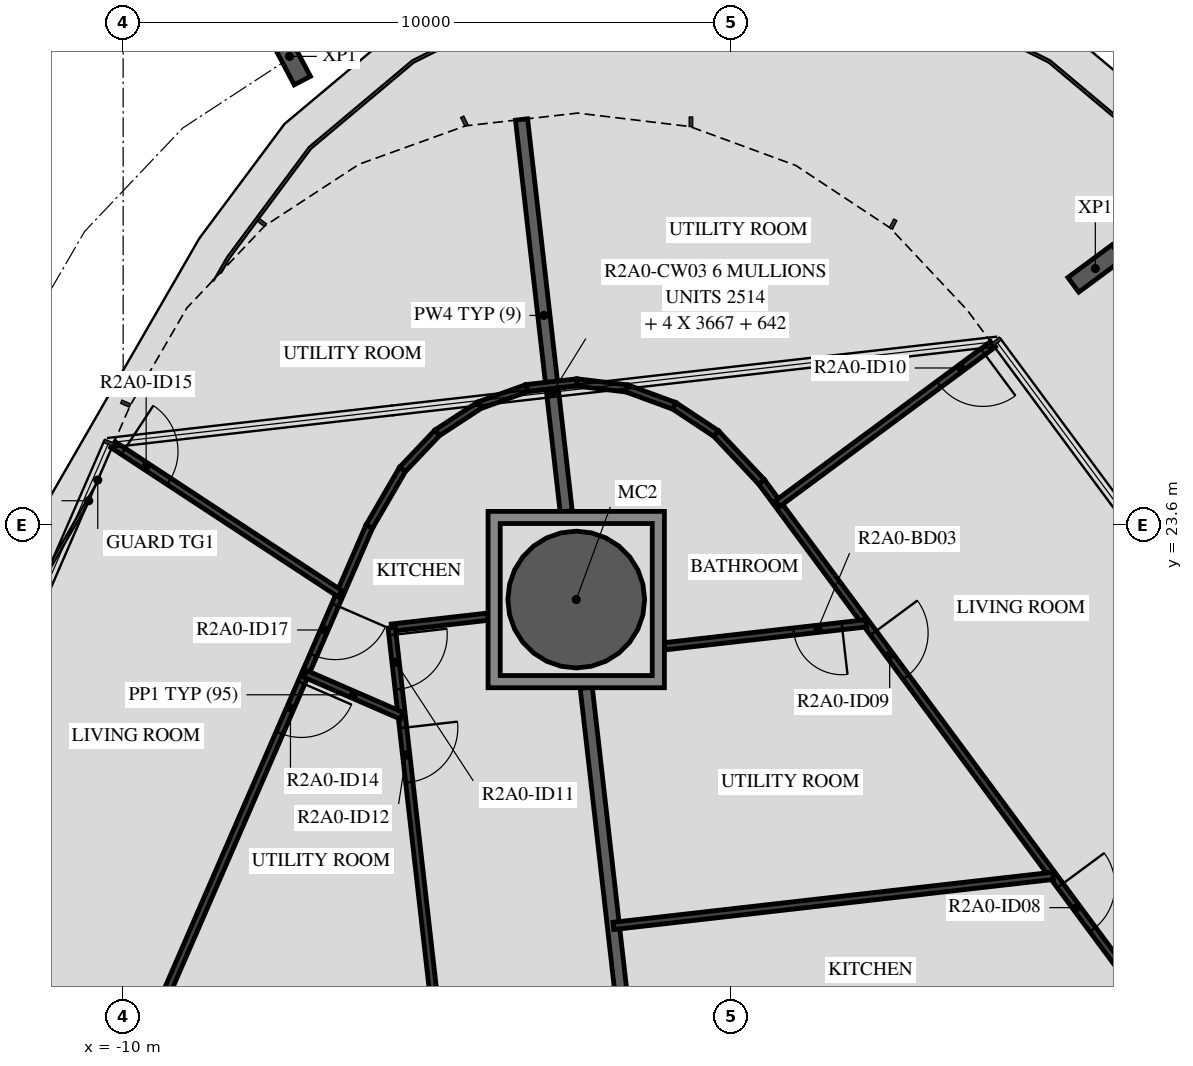
"""IFC4 building model, lengths in metres.
Left out: names, types, materials, properties, quantities, classifications, styles, units other than length and angle.
Written with IfcOpenShell. Run it as: python <this file> out.ifc"""

import sys

from ifc_helpers import new_model, si_unit, direction, frame, frame_2d, origin, origin_2d, place, context, subcontext, project, spatial, polyline, rectangle, hollow_circle, i_section, outline, extrude, element, fill, save


model = new_model("IFC4")
c1 = context("Model", 3, precision=1e-05, world=origin(), true_north=direction((0.0, 1.0)))
c2 = subcontext(c1, "Body", "Model", "MODEL_VIEW")
j1 = project(units=[si_unit("LENGTHUNIT", "METRE"), si_unit("PLANEANGLEUNIT", "RADIAN")], contexts=[c1])
p1 = place(None, origin())
s1 = spatial("IfcSite", under=j1, at=p1, CompositionType="ELEMENT")
p2 = place(p1, origin())
s2 = spatial("IfcBuilding", under=s1, at=p2, CompositionType="ELEMENT")
p3 = place(p2, frame((0.0, 0.0, 76.7)))
s3 = spatial("IfcBuildingStorey", under=s2, at=p3, CompositionType="ELEMENT", Elevation=76.7)
p4 = place(p3, frame((-2.549, 22.37, -0.45), z_axis=(0.0, 0.0, 1.0), x_axis=(1.0, 0.0, 0.0)))
e1 = element("IfcColumn", 1, at=p4, inside=s3, PredefinedType="COLUMN", context=c2, shape_type="SweptSolid", body=[
    extrude(hollow_circle(Radius=1.125, WallThickness=0.055, at=origin_2d()), origin(), (0.0, 0.0, 1.0), 3.57),
])
for number, where, z_axis, x_axis in (
    (2, (5.988, 27.814, -0.45), (0.0, 0.0, 1.0), (0.595, -0.804, 0.0)),
    (3, (-7.263, 31.302, -0.45), (0.0, 0.0, 1.0), (0.884, 0.467, 0.0)),
):
    element("IfcColumn", number, at=place(p3, frame(where, z_axis=z_axis, x_axis=x_axis)), inside=s3, PredefinedType="COLUMN", context=c2, shape_type="SweptSolid", body=[
        extrude(i_section(OverallWidth=0.3, OverallDepth=0.9, WebThickness=0.019, FlangeThickness=0.035, FilletRadius=0.03, at=origin_2d()), origin(), (0.0, 0.0, 1.0), 3.57),
    ])
p5 = place(p3, frame((-2.385, 20.92, 0.0), z_axis=(0.0, 0.0, 1.0), x_axis=(0.113177776247, -0.993574753586, 0.0)))
e4 = element("IfcWall", 4, at=p5, inside=s3, PredefinedType="STANDARD", context=c2, shape_type="SweptSolid", body=[
    extrude(rectangle(XDim=7.356, YDim=0.2, at=frame_2d((3.678, 0.0))), origin(), (0.0, 0.0, 1.0), 3.12),
])
p6 = place(p3, frame((-3.448, 30.265, 0.0), z_axis=(0.0, 0.0, 1.0), x_axis=(0.113178237968, -0.993574700992, 0.0)))
e5 = element("IfcWall", 5, at=p6, inside=s3, PredefinedType="STANDARD", context=c2, shape_type="SweptSolid", body=[
    extrude(rectangle(XDim=6.487, YDim=0.2, at=frame_2d((3.243, 0.0))), origin(), (0.0, 0.0, 1.0), 3.12),
])
p7 = place(p3, frame((0.498, 24.306, 0.0), z_axis=(0.0, 0.0, 1.0), x_axis=(0.594826266513, -0.803854285718, 0.0)))
e6 = element("IfcWall", 6, at=p7, inside=s3, PredefinedType="PARTITIONING", context=c2, shape_type="SweptSolid", body=[
    extrude(rectangle(XDim=11.875, YDim=0.12, at=frame_2d((5.938, 0.0))), origin(), (0.0, 0.0, 1.0), 3.12),
])
p8 = place(p7, frame((8.26, 0.0, 0.0)))
e7 = element("IfcOpeningElement", 7, at=p8, cuts=e6, PredefinedType="OPENING", context=c2, shape_type="SweptSolid", body=[
    extrude(rectangle(XDim=0.9, YDim=2.1, at=frame_2d((0.45, 1.05))), frame((0.0, 0.07, 0.0), z_axis=(0.0, -1.0, 0.0), x_axis=(1.0, 0.0, 0.0)), (0.0, 0.0, 1.0), 0.14),
])
p9 = place(p7, frame((3.094, 0.0, 0.0)))
e8 = element("IfcOpeningElement", 8, at=p9, cuts=e6, PredefinedType="OPENING", context=c2, shape_type="SweptSolid", body=[
    extrude(rectangle(XDim=0.9, YDim=2.1, at=frame_2d((0.45, 1.05))), frame((0.0, 0.07, 0.0), z_axis=(0.0, -1.0, 0.0), x_axis=(1.0, 0.0, 0.0)), (0.0, 0.0, 1.0), 0.14),
])
p10 = place(p3, frame((4.299, 26.565, 0.0), z_axis=(0.0, 0.0, 1.0), x_axis=(-0.803851981262, -0.594829380764, 0.0)))
e9 = element("IfcWall", 9, at=p10, inside=s3, PredefinedType="PARTITIONING", context=c2, shape_type="SweptSolid", body=[
    extrude(rectangle(XDim=4.4, YDim=0.12, at=frame_2d((2.2, 0.0))), origin(), (0.0, 0.0, 1.0), 2.73),
])
p11 = place(p10, frame((0.2, 0.0, 0.0)))
e10 = element("IfcOpeningElement", 10, at=p11, cuts=e9, PredefinedType="OPENING", context=c2, shape_type="SweptSolid", body=[
    extrude(rectangle(XDim=0.9, YDim=2.1, at=frame_2d((0.45, 1.05))), frame((0.0, 0.07, 0.0), z_axis=(0.0, -1.0, 0.0), x_axis=(1.0, 0.0, 0.0)), (0.0, 0.0, 1.0), 0.14),
])
p12 = place(p3, frame((5.292, 17.827, 0.0), z_axis=(0.0, 0.0, 1.0), x_axis=(-0.993570041735, -0.113219133399, 0.0)))
e11 = element("IfcWall", 11, at=p12, inside=s3, PredefinedType="PARTITIONING", context=c2, shape_type="SweptSolid", body=[
    extrude(rectangle(XDim=7.276, YDim=0.12, at=frame_2d((3.638, 0.0))), origin(), (0.0, 0.0, 1.0), 3.12),
])
p13 = place(p3, frame((2.219, 21.979, 0.0), z_axis=(0.0, 0.0, 1.0), x_axis=(-0.99357408397, -0.113183654573, 0.0)))
e12 = element("IfcWall", 12, at=p13, inside=s3, PredefinedType="PARTITIONING", context=c2, shape_type="SweptSolid", body=[
    extrude(rectangle(XDim=3.339, YDim=0.12, at=frame_2d((1.669, 0.0))), origin(), (0.0, 0.0, 1.0), 3.12),
])
p14 = place(p13, frame((0.4, 0.0, 0.0)))
e13 = element("IfcOpeningElement", 13, at=p14, cuts=e12, PredefinedType="OPENING", context=c2, shape_type="SweptSolid", body=[
    extrude(rectangle(XDim=0.8, YDim=2.1, at=frame_2d((0.4, 1.05))), frame((0.0, 0.07, 0.0), z_axis=(0.0, -1.0, 0.0), x_axis=(1.0, 0.0, 0.0)), (0.0, 0.0, 1.0), 0.14),
])
for number, where, z_axis, x_axis in (
    (14, (-3.362, 25.846, 0.0), (0.0, 0.0, 1.0), (0.994, 0.113, 0.0)),
    (15, (-2.538, 25.94, 0.0), (0.0, 0.0, 1.0), (0.993, -0.119, 0.0)),
    (16, (-1.715, 25.842, 0.0), (0.0, 0.0, 1.0), (0.939, -0.345, 0.0)),
    (17, (-0.937, 25.556, 0.0), (0.0, 0.0, 1.0), (0.834, -0.552, 0.0)),
):
    element("IfcWall", number, at=place(p3, frame(where, z_axis=z_axis, x_axis=x_axis)), inside=s3, PredefinedType="PARTITIONING", context=c2, shape_type="SweptSolid", body=[
        extrude(rectangle(XDim=0.829, YDim=0.12, at=frame_2d((0.415, 0.0))), origin(), (0.0, 0.0, 1.0), 3.12),
    ])
p15 = place(p3, frame((-0.246, 25.098, 0.0), z_axis=(0.0, 0.0, 1.0), x_axis=(0.684172712488, -0.729320025426, 0.0)))
e18 = element("IfcWall", 18, at=p15, inside=s3, PredefinedType="PARTITIONING", context=c2, shape_type="SweptSolid", body=[
    extrude(rectangle(XDim=1.087, YDim=0.12, at=frame_2d((0.543, 0.0))), origin(), (0.0, 0.0, 1.0), 3.12),
])
p16 = place(p3, frame((-3.999, 22.089, 0.0), z_axis=(0.0, 0.0, 1.0), x_axis=(-0.993550908639, -0.113386912568, 0.0)))
e19 = element("IfcWall", 19, at=p16, inside=s3, PredefinedType="PARTITIONING", context=c2, shape_type="SweptSolid", body=[
    extrude(rectangle(XDim=1.595, YDim=0.12, at=frame_2d((0.798, 0.0))), origin(), (0.0, 0.0, 1.0), 3.12),
])
p17 = place(p3, frame((-5.584, 21.908, 0.0), z_axis=(0.0, 0.0, 1.0), x_axis=(0.113192725021, -0.993573050662, 0.0)))
e20 = element("IfcWall", 20, at=p17, inside=s3, PredefinedType="PARTITIONING", context=c2, shape_type="SweptSolid", body=[
    extrude(rectangle(XDim=7.2, YDim=0.12, at=frame_2d((3.6, 0.0))), origin(), (0.0, 0.0, 1.0), 3.12),
])
p18 = place(p17, frame((0.12, 0.0, 0.0)))
e21 = element("IfcOpeningElement", 21, at=p18, cuts=e20, PredefinedType="OPENING", context=c2, shape_type="SweptSolid", body=[
    extrude(rectangle(XDim=0.9, YDim=2.1, at=frame_2d((0.45, 1.05))), frame((0.0, 0.07, 0.0), z_axis=(0.0, -1.0, 0.0), x_axis=(1.0, 0.0, 0.0)), (0.0, 0.0, 1.0), 0.14),
])
p19 = place(p17, frame((1.658, 0.0, 0.0)))
e22 = element("IfcOpeningElement", 22, at=p19, cuts=e20, PredefinedType="OPENING", context=c2, shape_type="SweptSolid", body=[
    extrude(rectangle(XDim=0.9, YDim=2.1, at=frame_2d((0.45, 1.05))), frame((0.0, 0.07, 0.0), z_axis=(0.0, -1.0, 0.0), x_axis=(1.0, 0.0, 0.0)), (0.0, 0.0, 1.0), 0.14),
])
p20 = place(p3, frame((-3.362, 25.846, 0.0), z_axis=(0.0, 0.0, 1.0), x_axis=(-0.940718391217, -0.33918860303, 0.0)))
e23 = element("IfcWall", 23, at=p20, inside=s3, PredefinedType="PARTITIONING", context=c2, shape_type="SweptSolid", body=[
    extrude(rectangle(XDim=0.829, YDim=0.12, at=frame_2d((0.415, 0.0))), origin(), (0.0, 0.0, 1.0), 3.12),
])
p21 = place(p3, frame((-4.142, 25.565, 0.0), z_axis=(0.0, 0.0, 1.0), x_axis=(-0.837047461437, -0.547130283664, 0.0)))
e24 = element("IfcWall", 24, at=p21, inside=s3, PredefinedType="PARTITIONING", context=c2, shape_type="SweptSolid", body=[
    extrude(rectangle(XDim=0.829, YDim=0.12, at=frame_2d((0.414, 0.0))), origin(), (0.0, 0.0, 1.0), 3.12),
])
p22 = place(p3, frame((-4.835, 25.112, 0.0), z_axis=(0.0, 0.0, 1.0), x_axis=(-0.688463067416, -0.72527140079, 0.0)))
e25 = element("IfcWall", 25, at=p22, inside=s3, PredefinedType="PARTITIONING", context=c2, shape_type="SweptSolid", body=[
    extrude(rectangle(XDim=0.829, YDim=0.12, at=frame_2d((0.415, 0.0))), origin(), (0.0, 0.0, 1.0), 3.12),
])
p23 = place(p3, frame((-5.406, 24.51, 0.0), z_axis=(0.0, 0.0, 1.0), x_axis=(-0.502487709822, -0.864584351858, 0.0)))
e26 = element("IfcWall", 26, at=p23, inside=s3, PredefinedType="PARTITIONING", context=c2, shape_type="SweptSolid", body=[
    extrude(rectangle(XDim=1.087, YDim=0.12, at=frame_2d((0.543, 0.0))), origin(), (0.0, 0.0, 1.0), 3.12),
])
p24 = place(p3, frame((-5.952, 23.571, 0.0), z_axis=(0.0, 0.0, 1.0), x_axis=(-0.398745097158, -0.917061801348, 0.0)))
e27 = element("IfcWall", 27, at=p24, inside=s3, PredefinedType="PARTITIONING", context=c2, shape_type="SweptSolid", body=[
    extrude(rectangle(XDim=14.576, YDim=0.12, at=frame_2d((7.288, 0.0))), origin(), (0.0, 0.0, 1.0), 3.12),
])
p25 = place(p24, frame((2.801, 0.0, 0.0)))
e28 = element("IfcOpeningElement", 28, at=p25, cuts=e27, PredefinedType="OPENING", context=c2, shape_type="SweptSolid", body=[
    extrude(rectangle(XDim=0.9, YDim=2.1, at=frame_2d((0.45, 1.05))), frame((0.0, 0.07, 0.0), z_axis=(0.0, -1.0, 0.0), x_axis=(1.0, 0.0, 0.0)), (0.0, 0.0, 1.0), 0.14),
])
p26 = place(p24, frame((1.405, 0.0, 0.0)))
e29 = element("IfcOpeningElement", 29, at=p26, cuts=e27, PredefinedType="OPENING", context=c2, shape_type="SweptSolid", body=[
    extrude(rectangle(XDim=0.9, YDim=2.1, at=frame_2d((0.45, 1.05))), frame((0.0, 0.07, 0.0), z_axis=(0.0, -1.0, 0.0), x_axis=(1.0, 0.0, 0.0)), (0.0, 0.0, 1.0), 0.14),
])
p27 = place(p3, frame((-7.005, 21.149, 0.0), z_axis=(0.0, 0.0, 1.0), x_axis=(0.917081274718, -0.398700307953, 0.0)))
e30 = element("IfcWall", 30, at=p27, inside=s3, PredefinedType="PARTITIONING", context=c2, shape_type="SweptSolid", body=[
    extrude(rectangle(XDim=1.73, YDim=0.12, at=frame_2d((0.865, 0.0))), origin(), (0.0, 0.0, 1.0), 3.12),
])
p28 = place(p3, frame((-10.165, 24.917, 0.0), z_axis=(0.0, 0.0, 1.0), x_axis=(0.835849562932, -0.548958566876, 0.0)))
e31 = element("IfcWall", 31, at=p28, inside=s3, PredefinedType="PARTITIONING", context=c2, shape_type="SweptSolid", body=[
    extrude(rectangle(XDim=4.465, YDim=0.12, at=frame_2d((2.232, 0.0))), origin(), (0.0, 0.0, 1.0), 2.73),
])
p29 = place(p28, frame((0.2, 0.0, 0.0)))
e32 = element("IfcOpeningElement", 32, at=p29, cuts=e31, PredefinedType="OPENING", context=c2, shape_type="SweptSolid", body=[
    extrude(rectangle(XDim=0.9, YDim=2.1, at=frame_2d((0.45, 1.05))), frame((0.0, 0.07, 0.0), z_axis=(0.0, -1.0, 0.0), x_axis=(1.0, 0.0, 0.0)), (0.0, 0.0, 1.0), 0.14),
])
p30 = place(p3, frame((-13.163, 18.022, 0.0), z_axis=(0.0, 0.0, 1.0), x_axis=(0.594797671626, -0.803875444226, 0.0)))
e33 = element("IfcWall", 33, at=p30, inside=s3, PredefinedType="PARTITIONING", context=c2, shape_type="SweptSolid", body=[
    extrude(rectangle(XDim=5.081, YDim=0.12, at=frame_2d((2.54, 0.0))), origin(), (0.0, 0.0, 1.0), 3.12),
])
p31 = place(p30, frame((0.4, 0.0, 0.0)))
e34 = element("IfcOpeningElement", 34, at=p31, cuts=e33, PredefinedType="OPENING", context=c2, shape_type="SweptSolid", body=[
    extrude(rectangle(XDim=0.9, YDim=2.1, at=frame_2d((0.45, 1.05))), frame((0.0, 0.07, 0.0), z_axis=(0.0, -1.0, 0.0), x_axis=(1.0, 0.0, 0.0)), (0.0, 0.0, 1.0), 0.14),
])
p32 = place(p3, origin())
e35 = element("IfcWall", 35, at=p32, inside=s3, PredefinedType="STANDARD", context=c2, shape_type="SweptSolid", body=[
    extrude(outline(polyline([(-1.099, 23.82), (-1.099, 20.92), (-3.999, 20.92), (-3.999, 23.82), (-1.099, 23.82)]), holes=[polyline([(-3.799, 21.12), (-1.299, 21.12), (-1.299, 23.62), (-3.799, 23.62), (-3.799, 21.12)])]), origin(), (0.0, 0.0, 1.0), 3.12),
])
p33 = place(p8, origin())
e36 = element("IfcDoor", 36, at=p33, inside=s3, OperationType="SINGLE_SWING_RIGHT", PredefinedType="DOOR", context=c2, shape_type="SweptSolid", body=[
    extrude(rectangle(XDim=0.9, YDim=2.1, at=frame_2d((0.45, 1.05))), frame((0.0, 0.025, 0.0), z_axis=(0.0, -1.0, 0.0), x_axis=(1.0, 0.0, 0.0)), (0.0, 0.0, 1.0), 0.05),
])
fill(e7, e36)
p34 = place(p9, origin())
e37 = element("IfcDoor", 37, at=p34, inside=s3, OperationType="SINGLE_SWING_LEFT", PredefinedType="DOOR", context=c2, shape_type="SweptSolid", body=[
    extrude(rectangle(XDim=0.9, YDim=2.1, at=frame_2d((0.45, 1.05))), frame((0.0, 0.025, 0.0), z_axis=(0.0, -1.0, 0.0), x_axis=(1.0, 0.0, 0.0)), (0.0, 0.0, 1.0), 0.05),
])
fill(e8, e37)
p35 = place(p14, origin())
e38 = element("IfcDoor", 38, at=p35, inside=s3, OperationType="SINGLE_SWING_RIGHT", PredefinedType="DOOR", context=c2, shape_type="SweptSolid", body=[
    extrude(rectangle(XDim=0.8, YDim=2.1, at=frame_2d((0.4, 1.05))), frame((0.0, 0.025, 0.0), z_axis=(0.0, -1.0, 0.0), x_axis=(1.0, 0.0, 0.0)), (0.0, 0.0, 1.0), 0.05),
])
fill(e13, e38)
p36 = place(p11, origin())
e39 = element("IfcDoor", 39, at=p36, inside=s3, OperationType="SINGLE_SWING_RIGHT", PredefinedType="DOOR", context=c2, shape_type="SweptSolid", body=[
    extrude(rectangle(XDim=0.9, YDim=2.1, at=frame_2d((0.45, 1.05))), frame((0.0, 0.025, 0.0), z_axis=(0.0, -1.0, 0.0), x_axis=(1.0, 0.0, 0.0)), (0.0, 0.0, 1.0), 0.05),
])
fill(e10, e39)
p37 = place(p18, origin())
e40 = element("IfcDoor", 40, at=p37, inside=s3, OperationType="SINGLE_SWING_RIGHT", PredefinedType="DOOR", context=c2, shape_type="SweptSolid", body=[
    extrude(rectangle(XDim=0.9, YDim=2.1, at=frame_2d((0.45, 1.05))), frame((0.0, 0.025, 0.0), z_axis=(0.0, -1.0, 0.0), x_axis=(1.0, 0.0, 0.0)), (0.0, 0.0, 1.0), 0.05),
])
fill(e21, e40)
p38 = place(p19, origin())
e41 = element("IfcDoor", 41, at=p38, inside=s3, OperationType="SINGLE_SWING_LEFT", PredefinedType="DOOR", context=c2, shape_type="SweptSolid", body=[
    extrude(rectangle(XDim=0.9, YDim=2.1, at=frame_2d((0.45, 1.05))), frame((0.0, 0.025, 0.0), z_axis=(0.0, -1.0, 0.0), x_axis=(1.0, 0.0, 0.0)), (0.0, 0.0, 1.0), 0.05),
])
fill(e22, e41)
p39 = place(p25, origin())
e42 = element("IfcDoor", 42, at=p39, inside=s3, OperationType="SINGLE_SWING_LEFT", PredefinedType="DOOR", context=c2, shape_type="SweptSolid", body=[
    extrude(rectangle(XDim=0.9, YDim=2.1, at=frame_2d((0.45, 1.05))), frame((0.0, 0.025, 0.0), z_axis=(0.0, -1.0, 0.0), x_axis=(1.0, 0.0, 0.0)), (0.0, 0.0, 1.0), 0.05),
])
fill(e28, e42)
p40 = place(p29, origin())
e43 = element("IfcDoor", 43, at=p40, inside=s3, OperationType="SINGLE_SWING_LEFT", PredefinedType="DOOR", context=c2, shape_type="SweptSolid", body=[
    extrude(rectangle(XDim=0.9, YDim=2.1, at=frame_2d((0.45, 1.05))), frame((0.0, 0.025, 0.0), z_axis=(0.0, -1.0, 0.0), x_axis=(1.0, 0.0, 0.0)), (0.0, 0.0, 1.0), 0.05),
])
fill(e32, e43)
p41 = place(p26, origin())
e44 = element("IfcDoor", 44, at=p41, inside=s3, OperationType="SINGLE_SWING_RIGHT", PredefinedType="DOOR", context=c2, shape_type="SweptSolid", body=[
    extrude(rectangle(XDim=0.9, YDim=2.1, at=frame_2d((0.45, 1.05))), frame((0.0, 0.025, 0.0), z_axis=(0.0, -1.0, 0.0), x_axis=(1.0, 0.0, 0.0)), (0.0, 0.0, 1.0), 0.05),
])
fill(e29, e44)
save(model, sys.argv[1])
